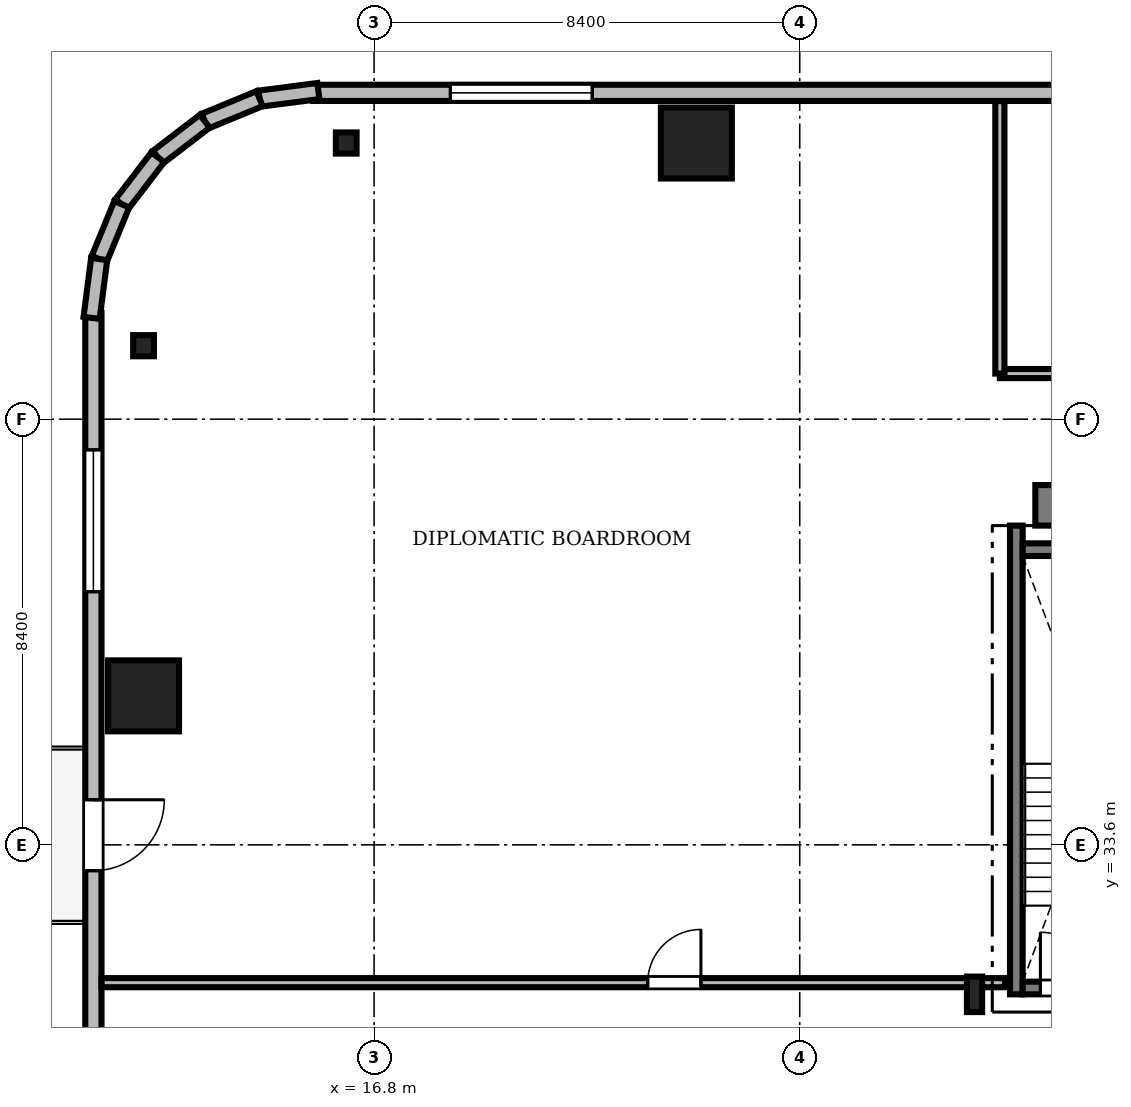
"""IFC4 building model, lengths in metres.
Left out: names, types, materials, properties, quantities, classifications, styles, units other than length and angle.
Written with IfcOpenShell. Run it as: python <this file> out.ifc"""

import sys

from ifc_helpers import new_model, si_unit, direction, frame, frame_2d, origin, origin_2d, place, context, subcontext, project, spatial, rectangle, i_section, extrude, source, transform, mapped, element, fill, save


model = new_model("IFC4")
c1 = context("Model", 3, precision=1e-05, world=origin(), true_north=direction((0.0, 1.0)))
c2 = subcontext(c1, "Body", "Model", "MODEL_VIEW")
j1 = project(units=[si_unit("LENGTHUNIT", "METRE"), si_unit("PLANEANGLEUNIT", "RADIAN")], contexts=[c1])
p1 = place(None, origin())
s1 = spatial("IfcSite", under=j1, at=p1, CompositionType="ELEMENT")
p2 = place(p1, origin())
s2 = spatial("IfcBuilding", under=s1, at=p2, CompositionType="ELEMENT")
p3 = place(p2, frame((0.0, 0.0, 218.55)))
s3 = spatial("IfcBuildingStorey", under=s2, at=p3, CompositionType="ELEMENT", Elevation=218.55)
m1 = source(origin(), c2, "Body", "SweptSolid", [
    extrude(rectangle(XDim=17.52, YDim=0.8, at=frame_2d((8.76, 0.0))), origin(), (0.0, 0.0, 1.0), 3.53),
])
p4 = place(p3, frame((29.85, 40.3, 0.0), z_axis=(0.0, 0.0, 1.0), x_axis=(1.0, 0.0, 0.0)))
e1 = element("IfcWall", 1, at=p4, inside=s3, PredefinedType="SHEAR", context=c2, shape_type="MappedRepresentation", body=[
    mapped(m1, transform((0.0, 0.0, 0.0), scale=1.0)),
])
m2 = source(origin(), c2, "Body", "SweptSolid", [
    extrude(i_section(OverallWidth=0.3, OverallDepth=0.7, WebThickness=0.017, FlangeThickness=0.032, FilletRadius=0.027, at=origin_2d()), origin(), (0.0, 0.0, 1.0), 3.53),
])
p5 = place(p3, frame((28.65, 30.65, 0.0), z_axis=(0.0, 0.0, 1.0), x_axis=(1.0, 0.0, 0.0)))
e2 = element("IfcColumn", 2, at=p5, inside=s3, PredefinedType="COLUMN", context=c2, shape_type="MappedRepresentation", body=[
    mapped(m2, transform((0.0, 0.0, 0.0), scale=1.0)),
])
m3 = source(origin(), c2, "Body", "SweptSolid", [
    extrude(rectangle(XDim=1.4, YDim=1.4, at=origin_2d()), origin(), (0.0, 0.0, 1.0), 3.53),
])
for number, where, z_axis, x_axis in (
    (3, (23.16, 47.45, 0.0), (0.0, 0.0, 1.0), (1.0, 0.0, 0.0)),
    (4, (12.25, 36.54, 0.0), (0.0, 0.0, 1.0), (1.0, 0.0, 0.0)),
):
    element("IfcColumn", number, at=place(p3, frame(where, z_axis=z_axis, x_axis=x_axis)), inside=s3, PredefinedType="COLUMN", context=c2, shape_type="MappedRepresentation", body=[
        mapped(m3, transform((0.0, 0.0, 0.0), scale=1.0)),
    ])
m4 = source(origin(), c2, "Body", "SweptSolid", [
    extrude(i_section(OverallWidth=0.409, OverallDepth=0.417, WebThickness=0.021, FlangeThickness=0.033, FilletRadius=0.015, at=origin_2d()), origin(), (0.0, 0.0, 1.0), 3.53),
])
for number, where, z_axis, x_axis in (
    (5, (16.25, 47.45, 0.0), (0.0, 0.0, 1.0), (1.0, 0.0, 0.0)),
    (6, (12.25, 43.45, 0.0), (0.0, 0.0, 1.0), (1.0, 0.0, 0.0)),
):
    element("IfcColumn", number, at=place(p3, frame(where, z_axis=z_axis, x_axis=x_axis)), inside=s3, PredefinedType="COLUMN", context=c2, shape_type="MappedRepresentation", body=[
        mapped(m4, transform((0.0, 0.0, 0.0), scale=1.0)),
    ])
m5 = source(origin(), c2, "Body", "SweptSolid", [
    extrude(rectangle(XDim=15.6, YDim=0.32, at=frame_2d((7.8, 0.0))), origin(), (0.0, 0.0, 1.0), 3.53),
])
p6 = place(p3, frame((31.2, 48.44, 0.0), z_axis=(0.0, 0.0, 1.0), x_axis=(-1.0, 0.0, 0.0)))
e7 = element("IfcWall", 7, at=p6, inside=s3, PredefinedType="SOLIDWALL", context=c2, shape_type="MappedRepresentation", body=[
    mapped(m5, transform((0.0, 0.0, 0.0), scale=1.0)),
])
m6 = source(origin(), c2, "Body", "SweptSolid", [
    extrude(rectangle(XDim=2.8, YDim=2.4, at=frame_2d((1.4, 1.2))), frame((0.0, 0.17, 0.0), z_axis=(0.0, -1.0, 0.0), x_axis=(1.0, 0.0, 0.0)), (0.0, 0.0, 1.0), 0.34),
])
p7 = place(p6, frame((10.095, 0.0, 0.72)))
e8 = element("IfcOpeningElement", 8, at=p7, cuts=e7, PredefinedType="OPENING", context=c2, shape_type="MappedRepresentation", body=[
    mapped(m6, transform((0.0, 0.0, 0.0), scale=1.0)),
])
m7 = source(origin(), c2, "Body", "SweptSolid", [
    extrude(rectangle(XDim=15.6, YDim=0.32, at=frame_2d((7.8, 0.0))), origin(), (0.0, 0.0, 1.0), 3.53),
])
p8 = place(p3, frame((11.26, 44.1, 0.0), z_axis=(0.0, 0.0, 1.0), x_axis=(0.0, -1.0, 0.0)))
e9 = element("IfcWall", 9, at=p8, inside=s3, PredefinedType="SOLIDWALL", context=c2, shape_type="MappedRepresentation", body=[
    mapped(m7, transform((0.0, 0.0, 0.0), scale=1.0)),
])
m8 = source(origin(), c2, "Body", "SweptSolid", [
    extrude(rectangle(XDim=1.4, YDim=2.3, at=frame_2d((0.7, 1.15))), frame((0.0, 0.17, 0.0), z_axis=(0.0, -1.0, 0.0), x_axis=(1.0, 0.0, 0.0)), (0.0, 0.0, 1.0), 0.34),
])
p9 = place(p8, frame((9.61, 0.0, 0.0)))
e10 = element("IfcOpeningElement", 10, at=p9, cuts=e9, PredefinedType="OPENING", context=c2, shape_type="MappedRepresentation", body=[
    mapped(m8, transform((0.0, 0.0, 0.0), scale=1.0)),
])
p10 = place(p8, frame((2.705, 0.0, 0.72)))
e11 = element("IfcOpeningElement", 11, at=p10, cuts=e9, PredefinedType="OPENING", context=c2, shape_type="MappedRepresentation", body=[
    mapped(m6, transform((0.0, 0.0, 0.0), scale=1.0)),
])
m9 = source(origin(), c2, "Body", "SweptSolid", [
    extrude(rectangle(XDim=1.17, YDim=0.32, at=frame_2d((0.585, 0.0))), origin(), (0.0, 0.0, 1.0), 3.53),
])
p11 = place(p3, frame((15.7, 48.476, 0.0), z_axis=(0.0, 0.0, 1.0), x_axis=(-0.991735963317, -0.128295670475, 0.0)))
e12 = element("IfcWall", 12, at=p11, inside=s3, PredefinedType="SOLIDWALL", context=c2, shape_type="MappedRepresentation", body=[
    mapped(m9, transform((0.0, 0.0, 0.0), scale=1.0)),
])
m10 = source(origin(), c2, "Body", "SweptSolid", [
    extrude(rectangle(XDim=1.169, YDim=0.32, at=frame_2d((0.584, 0.0))), origin(), (0.0, 0.0, 1.0), 3.53),
])
p12 = place(p3, frame((14.54, 48.325, 0.0), z_axis=(0.0, 0.0, 1.0), x_axis=(-0.924552646638, -0.381054331552, 0.0)))
e13 = element("IfcWall", 13, at=p12, inside=s3, PredefinedType="SOLIDWALL", context=c2, shape_type="MappedRepresentation", body=[
    mapped(m10, transform((0.0, 0.0, 0.0), scale=1.0)),
])
m11 = source(origin(), c2, "Body", "SweptSolid", [
    extrude(rectangle(XDim=1.169, YDim=0.32, at=frame_2d((0.584, 0.0))), origin(), (0.0, 0.0, 1.0), 3.53),
])
p13 = place(p3, frame((13.459, 47.88, 0.0), z_axis=(0.0, 0.0, 1.0), x_axis=(-0.793663520347, -0.608356981114, 0.0)))
e14 = element("IfcWall", 14, at=p13, inside=s3, PredefinedType="SOLIDWALL", context=c2, shape_type="MappedRepresentation", body=[
    mapped(m11, transform((0.0, 0.0, 0.0), scale=1.0)),
])
m12 = source(origin(), c2, "Body", "SweptSolid", [
    extrude(rectangle(XDim=1.169, YDim=0.32, at=frame_2d((0.584, 0.0))), origin(), (0.0, 0.0, 1.0), 3.53),
])
p14 = place(p3, frame((12.531, 47.169, 0.0), z_axis=(0.0, 0.0, 1.0), x_axis=(-0.608387696831, -0.793639975269, 0.0)))
e15 = element("IfcWall", 15, at=p14, inside=s3, PredefinedType="SOLIDWALL", context=c2, shape_type="MappedRepresentation", body=[
    mapped(m12, transform((0.0, 0.0, 0.0), scale=1.0)),
])
p15 = place(p3, frame((11.82, 46.241, 0.0), z_axis=(0.0, 0.0, 1.0), x_axis=(-0.381054331552, -0.924552646638, 0.0)))
e16 = element("IfcWall", 16, at=p15, inside=s3, PredefinedType="SOLIDWALL", context=c2, shape_type="MappedRepresentation", body=[
    mapped(m10, transform((0.0, 0.0, 0.0), scale=1.0)),
])
p16 = place(p3, frame((11.375, 45.16, 0.0), z_axis=(0.0, 0.0, 1.0), x_axis=(-0.128295670475, -0.991735963317, 0.0)))
e17 = element("IfcWall", 17, at=p16, inside=s3, PredefinedType="SOLIDWALL", context=c2, shape_type="MappedRepresentation", body=[
    mapped(m9, transform((0.0, 0.0, 0.0), scale=1.0)),
])
m13 = source(origin(), c2, "Body", "SweptSolid", [
    extrude(rectangle(XDim=9.25, YDim=0.25, at=frame_2d((4.625, 0.0))), origin(), (0.0, 0.0, 1.0), 3.55),
])
p17 = place(p3, frame((29.475, 30.65, 0.0), z_axis=(0.0, 0.0, 1.0), x_axis=(0.0, 1.0, 0.0)))
e18 = element("IfcWall", 18, at=p17, inside=s3, PredefinedType="SOLIDWALL", context=c2, shape_type="MappedRepresentation", body=[
    mapped(m13, transform((0.0, 0.0, 0.0), scale=1.0)),
])
m14 = source(origin(), c2, "Body", "SweptSolid", [
    extrude(rectangle(XDim=3.15, YDim=0.25, at=frame_2d((1.575, 0.0))), origin(), (0.0, 0.0, 1.0), 3.55),
])
p18 = place(p3, frame((29.6, 39.425, 0.0), z_axis=(0.0, 0.0, 1.0), x_axis=(1.0, 0.0, 0.0)))
e19 = element("IfcWall", 19, at=p18, inside=s3, PredefinedType="SOLIDWALL", context=c2, shape_type="MappedRepresentation", body=[
    mapped(m14, transform((0.0, 0.0, 0.0), scale=1.0)),
])
p19 = place(p3, frame((29.6, 30.775, 0.0), z_axis=(0.0, 0.0, 1.0), x_axis=(1.0, 0.0, 0.0)))
e20 = element("IfcWall", 20, at=p19, inside=s3, PredefinedType="SOLIDWALL", context=c2, shape_type="MappedRepresentation", body=[
    mapped(m14, transform((0.0, 0.0, 0.0), scale=1.0)),
])
m15 = source(origin(), c2, "Body", "SweptSolid", [
    extrude(rectangle(XDim=1.1, YDim=2.2, at=frame_2d((0.55, 1.1))), frame((0.0, 0.135, 0.0), z_axis=(0.0, -1.0, 0.0), x_axis=(1.0, 0.0, 0.0)), (0.0, 0.0, 1.0), 0.27),
])
p20 = place(p19, frame((0.35, 0.0, 0.0)))
e21 = element("IfcOpeningElement", 21, at=p20, cuts=e20, PredefinedType="OPENING", context=c2, shape_type="MappedRepresentation", body=[
    mapped(m15, transform((0.0, 0.0, 0.0), scale=1.0)),
])
m16 = source(origin(), c2, "Body", "SweptSolid", [
    extrude(rectangle(XDim=28.428, YDim=0.18, at=frame_2d((14.214, 0.0))), origin(), (0.0, 0.0, 1.0), 2.772),
])
p21 = place(p3, frame((29.15, 42.9, 0.0), z_axis=(0.0, 0.0, 1.0), x_axis=(1.0, 0.0, 0.0)))
e22 = element("IfcWall", 22, at=p21, inside=s3, PredefinedType="PARTITIONING", context=c2, shape_type="MappedRepresentation", body=[
    mapped(m16, transform((0.0, 0.0, 0.0), scale=1.0)),
])
m17 = source(origin(), c2, "Body", "SweptSolid", [
    extrude(rectangle(XDim=1.05, YDim=2.2, at=frame_2d((0.525, 1.1))), frame((0.0, 0.1, 0.0), z_axis=(0.0, -1.0, 0.0), x_axis=(1.0, 0.0, 0.0)), (0.0, 0.0, 1.0), 0.2),
])
p22 = place(p21, frame((4.5, 0.0, 0.0)))
e23 = element("IfcOpeningElement", 23, at=p22, cuts=e22, PredefinedType="OPENING", context=c2, shape_type="MappedRepresentation", body=[
    mapped(m17, transform((0.0, 0.0, 0.0), scale=1.0)),
])
m18 = source(origin(), c2, "Body", "SweptSolid", [
    extrude(rectangle(XDim=17.828, YDim=0.18, at=frame_2d((8.914, 0.0))), origin(), (0.0, 0.0, 1.0), 2.772),
])
p23 = place(p3, frame((11.422, 30.88, 0.0), z_axis=(0.0, 0.0, 1.0), x_axis=(1.0, 0.0, 0.0)))
e24 = element("IfcWall", 24, at=p23, inside=s3, PredefinedType="PARTITIONING", context=c2, shape_type="MappedRepresentation", body=[
    mapped(m18, transform((0.0, 0.0, 0.0), scale=1.0)),
])
p24 = place(p23, frame((10.778, 0.0, 0.0)))
e25 = element("IfcOpeningElement", 25, at=p24, cuts=e24, PredefinedType="OPENING", context=c2, shape_type="MappedRepresentation", body=[
    mapped(m17, transform((0.0, 0.0, 0.0), scale=1.0)),
])
m19 = source(origin(), c2, "Body", "SweptSolid", [
    extrude(rectangle(XDim=5.378, YDim=0.18, at=frame_2d((2.689, 0.0))), origin(), (0.0, 0.0, 1.0), 2.772),
])
p25 = place(p3, frame((29.15, 42.9, 0.0), z_axis=(0.0, 0.0, 1.0), x_axis=(0.0, 1.0, 0.0)))
e26 = element("IfcWall", 26, at=p25, inside=s3, PredefinedType="PARTITIONING", context=c2, shape_type="MappedRepresentation", body=[
    mapped(m19, transform((0.0, 0.0, 0.0), scale=1.0)),
])
m20 = source(origin(), c2, "Body", "SweptSolid", [
    extrude(rectangle(XDim=2.8, YDim=2.4, at=frame_2d((1.4, 1.2))), frame((0.0, 0.03, 0.0), z_axis=(0.0, -1.0, 0.0), x_axis=(1.0, 0.0, 0.0)), (0.0, 0.0, 1.0), 0.06),
])
p26 = place(p7, origin())
e27 = element("IfcWindow", 27, at=p26, inside=s3, PartitioningType="SINGLE_PANEL", PredefinedType="WINDOW", context=c2, shape_type="MappedRepresentation", body=[
    mapped(m20, transform((0.0, 0.0, 0.0), scale=1.0)),
])
fill(e8, e27)
m21 = source(origin(), c2, "Body", "SweptSolid", [
    extrude(rectangle(XDim=1.4, YDim=2.3, at=frame_2d((0.7, 1.15))), frame((0.0, 0.025, 0.0), z_axis=(0.0, -1.0, 0.0), x_axis=(1.0, 0.0, 0.0)), (0.0, 0.0, 1.0), 0.05),
])
p27 = place(p9, frame((1.4, 0.0, 0.0), z_axis=(0.0, 0.0, 1.0), x_axis=(-1.0, 0.0, 0.0)))
e28 = element("IfcDoor", 28, at=p27, inside=s3, OperationType="DOUBLE_DOOR_SLIDING", PredefinedType="DOOR", context=c2, shape_type="MappedRepresentation", body=[
    mapped(m21, transform((0.0, 0.0, 0.0), scale=1.0)),
])
fill(e10, e28)
p28 = place(p10, origin())
e29 = element("IfcWindow", 29, at=p28, inside=s3, PartitioningType="SINGLE_PANEL", PredefinedType="WINDOW", context=c2, shape_type="MappedRepresentation", body=[
    mapped(m20, transform((0.0, 0.0, 0.0), scale=1.0)),
])
fill(e11, e29)
m22 = source(origin(), c2, "Body", "SweptSolid", [
    extrude(rectangle(XDim=1.1, YDim=2.2, at=frame_2d((0.55, 1.1))), frame((0.0, 0.025, 0.0), z_axis=(0.0, -1.0, 0.0), x_axis=(1.0, 0.0, 0.0)), (0.0, 0.0, 1.0), 0.05),
])
p29 = place(p20, origin())
e30 = element("IfcDoor", 30, at=p29, inside=s3, OperationType="SINGLE_SWING_LEFT", PredefinedType="DOOR", context=c2, shape_type="MappedRepresentation", body=[
    mapped(m22, transform((0.0, 0.0, 0.0), scale=1.0)),
])
fill(e21, e30)
m23 = source(origin(), c2, "Body", "SweptSolid", [
    extrude(rectangle(XDim=1.05, YDim=2.2, at=frame_2d((0.525, 1.1))), frame((0.0, 0.025, 0.0), z_axis=(0.0, -1.0, 0.0), x_axis=(1.0, 0.0, 0.0)), (0.0, 0.0, 1.0), 0.05),
])
p30 = place(p24, origin())
e31 = element("IfcDoor", 31, at=p30, inside=s3, OperationType="SINGLE_SWING_RIGHT", PredefinedType="DOOR", context=c2, shape_type="MappedRepresentation", body=[
    mapped(m23, transform((0.0, 0.0, 0.0), scale=1.0)),
])
fill(e25, e31)
save(model, sys.argv[1])
